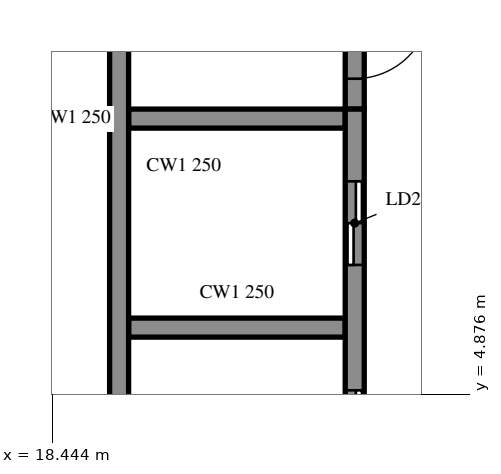
"""IFC4 building model, lengths in metres.
Left out: names, types, materials, properties, quantities, classifications, styles, units other than length and angle.
Written with IfcOpenShell. Run it as: python <this file> out.ifc"""

import sys

from ifc_helpers import new_model, si_unit, direction, frame, frame_2d, origin, place, context, subcontext, project, spatial, rectangle, extrude, element, fill, save


model = new_model("IFC4")
c1 = context("Model", 3, precision=1e-05, world=origin(), true_north=direction((0.0, 1.0)))
c2 = subcontext(c1, "Body", "Model", "MODEL_VIEW")
j1 = project(units=[si_unit("LENGTHUNIT", "METRE"), si_unit("PLANEANGLEUNIT", "RADIAN")], contexts=[c1])
p1 = place(None, origin())
s1 = spatial("IfcSite", under=j1, at=p1, CompositionType="ELEMENT")
p2 = place(p1, origin())
s2 = spatial("IfcBuilding", under=s1, at=p2, CompositionType="ELEMENT")
p3 = place(p2, frame((0.0, 0.0, 117.6)))
s3 = spatial("IfcBuildingStorey", under=s2, at=p3, CompositionType="ELEMENT", Elevation=117.6)
p4 = place(p3, frame((19.325, 15.125, 0.0), z_axis=(0.0, 0.0, 1.0), x_axis=(0.0, -1.0, 0.0)))
e1 = element("IfcWall", 1, at=p4, inside=s3, PredefinedType="SOLIDWALL", context=c2, shape_type="SweptSolid", body=[
    extrude(rectangle(XDim=24.25, YDim=0.25, at=frame_2d((12.125, 0.0))), origin(), (0.0, 0.0, 1.0), 4.06),
])
p5 = place(p3, frame((22.425, -8.875, 0.0), z_axis=(0.0, 0.0, 1.0), x_axis=(0.0, 1.0, 0.0)))
e2 = element("IfcWall", 2, at=p5, inside=s3, PredefinedType="SOLIDWALL", context=c2, shape_type="SweptSolid", body=[
    extrude(rectangle(XDim=17.5, YDim=0.25, at=frame_2d((8.75, 0.0))), origin(), (0.0, 0.0, 1.0), 4.06),
])
p6 = place(p5, frame((7.2, 0.0, 0.0)))
e3 = element("IfcOpeningElement", 3, at=p6, cuts=e2, PredefinedType="OPENING", context=c2, shape_type="SweptSolid", body=[
    extrude(rectangle(XDim=1.1, YDim=2.1, at=frame_2d((0.55, 1.05))), frame((0.0, 0.135, 0.0), z_axis=(0.0, -1.0, 0.0), x_axis=(1.0, 0.0, 0.0)), (0.0, 0.0, 1.0), 0.27),
])
p7 = place(p5, frame((9.95, 0.0, 0.0)))
e4 = element("IfcOpeningElement", 4, at=p7, cuts=e2, PredefinedType="OPENING", context=c2, shape_type="SweptSolid", body=[
    extrude(rectangle(XDim=1.1, YDim=2.1, at=frame_2d((0.55, 1.05))), frame((0.0, 0.135, 0.0), z_axis=(0.0, -1.0, 0.0), x_axis=(1.0, 0.0, 0.0)), (0.0, 0.0, 1.0), 0.27),
])
p8 = place(p5, frame((12.7, 0.0, 0.0)))
e5 = element("IfcOpeningElement", 5, at=p8, cuts=e2, PredefinedType="OPENING", context=c2, shape_type="SweptSolid", body=[
    extrude(rectangle(XDim=1.1, YDim=2.1, at=frame_2d((0.55, 1.05))), frame((0.0, 0.135, 0.0), z_axis=(0.0, -1.0, 0.0), x_axis=(1.0, 0.0, 0.0)), (0.0, 0.0, 1.0), 0.27),
])
p9 = place(p5, frame((15.45, 0.0, 0.0)))
e6 = element("IfcOpeningElement", 6, at=p9, cuts=e2, PredefinedType="OPENING", context=c2, shape_type="SweptSolid", body=[
    extrude(rectangle(XDim=1.1, YDim=2.1, at=frame_2d((0.55, 1.05))), frame((0.0, 0.135, 0.0), z_axis=(0.0, -1.0, 0.0), x_axis=(1.0, 0.0, 0.0)), (0.0, 0.0, 1.0), 0.27),
])
p10 = place(p5, frame((0.712, 0.0, 0.0)))
e7 = element("IfcOpeningElement", 7, at=p10, cuts=e2, PredefinedType="OPENING", context=c2, shape_type="SweptSolid", body=[
    extrude(rectangle(XDim=0.9, YDim=2.1, at=frame_2d((0.45, 1.05))), frame((0.0, 0.135, 0.0), z_axis=(0.0, -1.0, 0.0), x_axis=(1.0, 0.0, 0.0)), (0.0, 0.0, 1.0), 0.27),
])
p11 = place(p5, frame((3.788, 0.0, 0.0)))
e8 = element("IfcOpeningElement", 8, at=p11, cuts=e2, PredefinedType="OPENING", context=c2, shape_type="SweptSolid", body=[
    extrude(rectangle(XDim=0.9, YDim=2.1, at=frame_2d((0.45, 1.05))), frame((0.0, 0.135, 0.0), z_axis=(0.0, -1.0, 0.0), x_axis=(1.0, 0.0, 0.0)), (0.0, 0.0, 1.0), 0.27),
])
p12 = place(p3, frame((22.425, 14.875, 0.0), z_axis=(0.0, 0.0, 1.0), x_axis=(0.0, -1.0, 0.0)))
e9 = element("IfcWall", 9, at=p12, inside=s3, PredefinedType="SOLIDWALL", context=c2, shape_type="SweptSolid", body=[
    extrude(rectangle(XDim=6.25, YDim=0.25, at=frame_2d((3.125, 0.0))), origin(), (0.0, 0.0, 1.0), 4.06),
])
p13 = place(p12, frame((4.85, 0.0, 0.0)))
e10 = element("IfcOpeningElement", 10, at=p13, cuts=e9, PredefinedType="OPENING", context=c2, shape_type="SweptSolid", body=[
    extrude(rectangle(XDim=1.0, YDim=2.1, at=frame_2d((0.5, 1.05))), frame((0.0, 0.135, 0.0), z_axis=(0.0, -1.0, 0.0), x_axis=(1.0, 0.0, 0.0)), (0.0, 0.0, 1.0), 0.27),
])
for number, where, z_axis, x_axis in (
    (11, (19.45, 5.75, 0.0), (0.0, 0.0, 1.0), (1.0, 0.0, 0.0)),
    (12, (19.45, 8.5, 0.0), (0.0, 0.0, 1.0), (1.0, 0.0, 0.0)),
):
    element("IfcWall", number, at=place(p3, frame(where, z_axis=z_axis, x_axis=x_axis)), inside=s3, PredefinedType="SOLIDWALL", context=c2, shape_type="SweptSolid", body=[
        extrude(rectangle(XDim=2.85, YDim=0.25, at=frame_2d((1.425, 0.0))), origin(), (0.0, 0.0, 1.0), 4.06),
    ])
p14 = place(p8, origin())
e13 = element("IfcDoor", 13, at=p14, inside=s3, OperationType="DOUBLE_DOOR_SLIDING", PredefinedType="DOOR", context=c2, shape_type="SweptSolid", body=[
    extrude(rectangle(XDim=1.1, YDim=2.1, at=frame_2d((0.55, 1.05))), frame((0.0, 0.025, 0.0), z_axis=(0.0, -1.0, 0.0), x_axis=(1.0, 0.0, 0.0)), (0.0, 0.0, 1.0), 0.05),
])
fill(e5, e13)
p15 = place(p9, origin())
e14 = element("IfcDoor", 14, at=p15, inside=s3, OperationType="DOUBLE_DOOR_SLIDING", PredefinedType="DOOR", context=c2, shape_type="SweptSolid", body=[
    extrude(rectangle(XDim=1.1, YDim=2.1, at=frame_2d((0.55, 1.05))), frame((0.0, 0.025, 0.0), z_axis=(0.0, -1.0, 0.0), x_axis=(1.0, 0.0, 0.0)), (0.0, 0.0, 1.0), 0.05),
])
fill(e6, e14)
p16 = place(p13, origin())
e15 = element("IfcDoor", 15, at=p16, inside=s3, OperationType="SINGLE_SWING_RIGHT", PredefinedType="DOOR", context=c2, shape_type="SweptSolid", body=[
    extrude(rectangle(XDim=1.0, YDim=2.1, at=frame_2d((0.5, 1.05))), frame((0.0, 0.025, 0.0), z_axis=(0.0, -1.0, 0.0), x_axis=(1.0, 0.0, 0.0)), (0.0, 0.0, 1.0), 0.05),
])
fill(e10, e15)
save(model, sys.argv[1])
